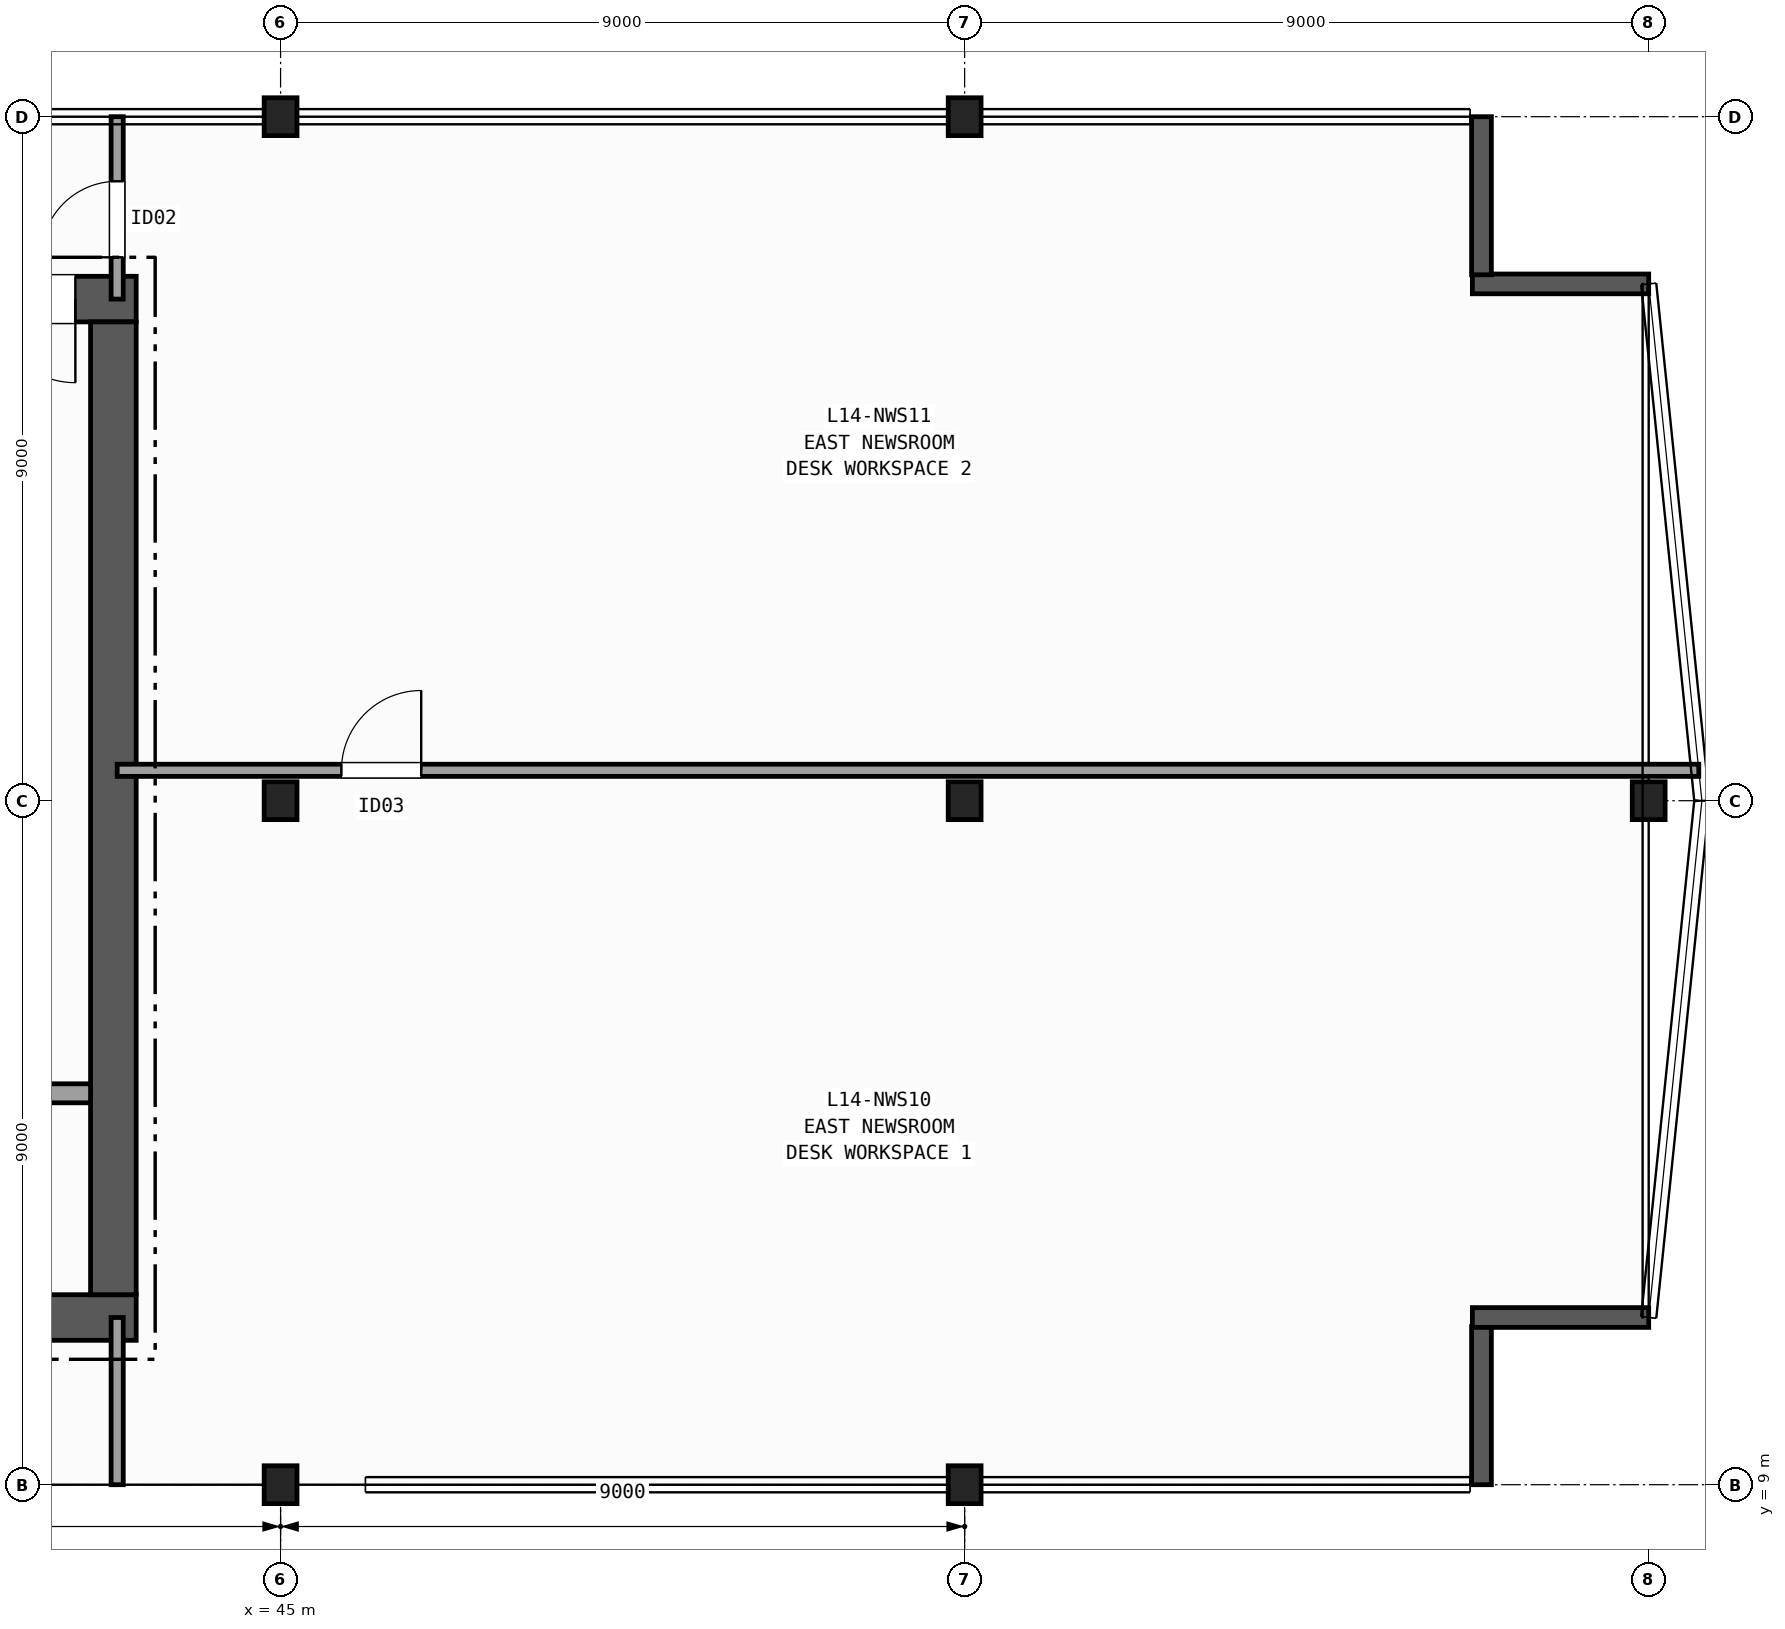
"""IFC4 building model, lengths in metres.
Left out: names, types, materials, properties, quantities, classifications, styles, units other than length and angle.
Written with IfcOpenShell. Run it as: python <this file> out.ifc"""

import sys

from ifc_helpers import new_model, si_unit, direction, frame, frame_2d, origin, origin_2d, place, context, subcontext, project, spatial, rectangle, i_section, extrude, element, fill, save


model = new_model("IFC4")
c1 = context("Model", 3, precision=1e-05, world=origin(), true_north=direction((0.0, 1.0)))
c2 = subcontext(c1, "Body", "Model", "MODEL_VIEW")
j1 = project(units=[si_unit("LENGTHUNIT", "METRE"), si_unit("PLANEANGLEUNIT", "RADIAN")], contexts=[c1])
p1 = place(None, origin())
s1 = spatial("IfcSite", under=j1, at=p1, CompositionType="ELEMENT")
p2 = place(p1, origin())
s2 = spatial("IfcBuilding", under=s1, at=p2, CompositionType="ELEMENT")
p3 = place(p2, frame((0.0, 0.0, 61.9)))
s3 = spatial("IfcBuildingStorey", under=s2, at=p3, CompositionType="ELEMENT", Elevation=61.9)
for number, where, z_axis, x_axis in (
    (1, (45.0, 9.0, 0.0), (0.0, 0.0, 1.0), (1.0, 0.0, 0.0)),
    (2, (45.0, 18.0, 0.0), (0.0, 0.0, 1.0), (1.0, 0.0, 0.0)),
    (3, (45.0, 27.0, 0.0), (0.0, 0.0, 1.0), (1.0, 0.0, 0.0)),
    (4, (54.0, 9.0, 0.0), (0.0, 0.0, 1.0), (1.0, 0.0, 0.0)),
    (5, (54.0, 18.0, 0.0), (0.0, 0.0, 1.0), (1.0, 0.0, 0.0)),
    (6, (54.0, 27.0, 0.0), (0.0, 0.0, 1.0), (1.0, 0.0, 0.0)),
    (7, (63.0, 18.0, 0.0), (0.0, 0.0, 1.0), (1.0, 0.0, 0.0)),
):
    element("IfcColumn", number, at=place(p3, frame(where, z_axis=z_axis, x_axis=x_axis)), inside=s3, PredefinedType="COLUMN", context=c2, shape_type="SweptSolid", body=[
        extrude(i_section(OverallWidth=0.432, OverallDepth=0.498, WebThickness=0.056, FlangeThickness=0.089, FilletRadius=0.015, at=origin_2d()), origin(), (0.0, 0.0, 1.0), 3.7),
    ])
p4 = place(p3, frame((60.8, 9.0, 0.0), z_axis=(0.0, 0.0, 1.0), x_axis=(0.0, 1.0, 0.0)))
e8 = element("IfcWall", 8, at=p4, inside=s3, PredefinedType="SOLIDWALL", context=c2, shape_type="SweptSolid", body=[
    extrude(rectangle(XDim=2.08, YDim=0.26, at=frame_2d((1.04, 0.0))), origin(), (0.0, 0.0, 1.0), 3.42),
])
for number, where, z_axis, x_axis in (
    (9, (60.68, 11.2, 0.0), (0.0, 0.0, 1.0), (1.0, 0.0, 0.0)),
    (10, (63.0, 24.8, 0.0), (0.0, 0.0, 1.0), (-1.0, 0.0, 0.0)),
):
    element("IfcWall", number, at=place(p3, frame(where, z_axis=z_axis, x_axis=x_axis)), inside=s3, PredefinedType="SOLIDWALL", context=c2, shape_type="SweptSolid", body=[
        extrude(rectangle(XDim=2.32, YDim=0.26, at=frame_2d((1.16, 0.0))), origin(), (0.0, 0.0, 1.0), 3.42),
    ])
p5 = place(p3, frame((60.8, 24.92, 0.0), z_axis=(0.0, 0.0, 1.0), x_axis=(0.0, 1.0, 0.0)))
e11 = element("IfcWall", 11, at=p5, inside=s3, PredefinedType="SOLIDWALL", context=c2, shape_type="SweptSolid", body=[
    extrude(rectangle(XDim=2.08, YDim=0.26, at=frame_2d((1.04, 0.0))), origin(), (0.0, 0.0, 1.0), 3.42),
])
p6 = place(p3, frame((29.1, 11.2, 0.0), z_axis=(0.0, 0.0, 1.0), x_axis=(1.0, 0.0, 0.0)))
e12 = element("IfcWall", 12, at=p6, inside=s3, PredefinedType="SHEAR", context=c2, shape_type="SweptSolid", body=[
    extrude(rectangle(XDim=14.0, YDim=0.6, at=frame_2d((7.0, 0.0))), origin(), (0.0, 0.0, 1.0), 3.42),
])
p7 = place(p3, frame((43.1, 24.6, 0.0), z_axis=(0.0, 0.0, 1.0), x_axis=(-1.0, 0.0, 0.0)))
e13 = element("IfcWall", 13, at=p7, inside=s3, PredefinedType="SHEAR", context=c2, shape_type="SweptSolid", body=[
    extrude(rectangle(XDim=14.0, YDim=0.6, at=frame_2d((7.0, 0.0))), origin(), (0.0, 0.0, 1.0), 3.42),
])
p8 = place(p7, frame((0.8, 0.0, 0.0)))
e14 = element("IfcOpeningElement", 14, at=p8, cuts=e13, PredefinedType="OPENING", context=c2, shape_type="SweptSolid", body=[
    extrude(rectangle(XDim=1.1, YDim=2.15, at=frame_2d((0.55, 1.075))), frame((0.0, 0.31, 0.0), z_axis=(0.0, -1.0, 0.0), x_axis=(1.0, 0.0, 0.0)), (0.0, 0.0, 1.0), 0.62),
])
p9 = place(p7, frame((2.75, 0.0, 0.0)))
e15 = element("IfcOpeningElement", 15, at=p9, cuts=e13, PredefinedType="OPENING", context=c2, shape_type="SweptSolid", body=[
    extrude(rectangle(XDim=0.9, YDim=2.1, at=frame_2d((0.45, 1.05))), frame((0.0, 0.31, 0.0), z_axis=(0.0, -1.0, 0.0), x_axis=(1.0, 0.0, 0.0)), (0.0, 0.0, 1.0), 0.62),
])
p10 = place(p7, frame((4.65, 0.0, 0.0)))
e16 = element("IfcOpeningElement", 16, at=p10, cuts=e13, PredefinedType="OPENING", context=c2, shape_type="SweptSolid", body=[
    extrude(rectangle(XDim=0.9, YDim=2.1, at=frame_2d((0.45, 1.05))), frame((0.0, 0.31, 0.0), z_axis=(0.0, -1.0, 0.0), x_axis=(1.0, 0.0, 0.0)), (0.0, 0.0, 1.0), 0.62),
])
p11 = place(p3, frame((42.8, 11.5, 0.0), z_axis=(0.0, 0.0, 1.0), x_axis=(0.0, 1.0, 0.0)))
e17 = element("IfcWall", 17, at=p11, inside=s3, PredefinedType="SHEAR", context=c2, shape_type="SweptSolid", body=[
    extrude(rectangle(XDim=12.8, YDim=0.6, at=frame_2d((6.4, 0.0))), origin(), (0.0, 0.0, 1.0), 3.42),
])
p12 = place(p3, frame((33.07, 14.15, 0.0), z_axis=(0.0, 0.0, 1.0), x_axis=(1.0, 0.0, 0.0)))
e18 = element("IfcWall", 18, at=p12, inside=s3, PredefinedType="PARTITIONING", context=c2, shape_type="SweptSolid", body=[
    extrude(rectangle(XDim=9.43, YDim=0.25, at=frame_2d((4.715, 0.0))), origin(), (0.0, 0.0, 1.0), 3.42),
])
p13 = place(p12, frame((0.755, 0.0, 0.0)))
e19 = element("IfcOpeningElement", 19, at=p13, cuts=e18, PredefinedType="OPENING", context=c2, shape_type="SweptSolid", body=[
    extrude(rectangle(XDim=1.15, YDim=2.15, at=frame_2d((0.575, 1.075))), frame((0.0, 0.135, 0.0), z_axis=(0.0, -1.0, 0.0), x_axis=(1.0, 0.0, 0.0)), (0.0, 0.0, 1.0), 0.27),
])
p14 = place(p12, frame((3.355, 0.0, 0.0)))
e20 = element("IfcOpeningElement", 20, at=p14, cuts=e18, PredefinedType="OPENING", context=c2, shape_type="SweptSolid", body=[
    extrude(rectangle(XDim=1.15, YDim=2.15, at=frame_2d((0.575, 1.075))), frame((0.0, 0.135, 0.0), z_axis=(0.0, -1.0, 0.0), x_axis=(1.0, 0.0, 0.0)), (0.0, 0.0, 1.0), 0.27),
])
p15 = place(p3, frame((42.85, 9.0, 0.0), z_axis=(0.0, 0.0, 1.0), x_axis=(0.0, 1.0, 0.0)))
e21 = element("IfcWall", 21, at=p15, inside=s3, PredefinedType="PARTITIONING", context=c2, shape_type="SweptSolid", body=[
    extrude(rectangle(XDim=2.2, YDim=0.16, at=frame_2d((1.1, 0.0))), origin(), (0.0, 0.0, 1.0), 2.627),
])
p16 = place(p3, frame((42.85, 24.6, 0.0), z_axis=(0.0, 0.0, 1.0), x_axis=(0.0, 1.0, 0.0)))
e22 = element("IfcWall", 22, at=p16, inside=s3, PredefinedType="PARTITIONING", context=c2, shape_type="SweptSolid", body=[
    extrude(rectangle(XDim=2.4, YDim=0.16, at=frame_2d((1.2, 0.0))), origin(), (0.0, 0.0, 1.0), 2.627),
])
p17 = place(p16, frame((0.55, 0.0, 0.0)))
e23 = element("IfcOpeningElement", 23, at=p17, cuts=e22, PredefinedType="OPENING", context=c2, shape_type="SweptSolid", body=[
    extrude(rectangle(XDim=1.0, YDim=2.1, at=frame_2d((0.5, 1.05))), frame((0.0, 0.09, 0.0), z_axis=(0.0, -1.0, 0.0), x_axis=(1.0, 0.0, 0.0)), (0.0, 0.0, 1.0), 0.18),
])
p18 = place(p3, frame((42.85, 18.4, 0.0), z_axis=(0.0, 0.0, 1.0), x_axis=(1.0, 0.0, 0.0)))
e24 = element("IfcWall", 24, at=p18, inside=s3, PredefinedType="PARTITIONING", context=c2, shape_type="SweptSolid", body=[
    extrude(rectangle(XDim=20.809, YDim=0.16, at=frame_2d((10.404, 0.0))), origin(), (0.0, 0.0, 1.0), 3.42),
])
p19 = place(p18, frame((2.95, 0.0, 0.0)))
e25 = element("IfcOpeningElement", 25, at=p19, cuts=e24, PredefinedType="OPENING", context=c2, shape_type="SweptSolid", body=[
    extrude(rectangle(XDim=1.05, YDim=2.15, at=frame_2d((0.525, 1.075))), frame((0.0, 0.09, 0.0), z_axis=(0.0, -1.0, 0.0), x_axis=(1.0, 0.0, 0.0)), (0.0, 0.0, 1.0), 0.18),
])
p20 = place(p8, origin())
e26 = element("IfcDoor", 26, at=p20, inside=s3, OperationType="SINGLE_SWING_LEFT", PredefinedType="DOOR", context=c2, shape_type="SweptSolid", body=[
    extrude(rectangle(XDim=1.1, YDim=2.15, at=frame_2d((0.55, 1.075))), frame((0.0, 0.025, 0.0), z_axis=(0.0, -1.0, 0.0), x_axis=(1.0, 0.0, 0.0)), (0.0, 0.0, 1.0), 0.05),
])
fill(e14, e26)
p21 = place(p17, origin())
e27 = element("IfcDoor", 27, at=p21, inside=s3, OperationType="SINGLE_SWING_LEFT", PredefinedType="DOOR", context=c2, shape_type="SweptSolid", body=[
    extrude(rectangle(XDim=1.0, YDim=2.1, at=frame_2d((0.5, 1.05))), frame((0.0, 0.025, 0.0), z_axis=(0.0, -1.0, 0.0), x_axis=(1.0, 0.0, 0.0)), (0.0, 0.0, 1.0), 0.05),
])
fill(e23, e27)
p22 = place(p19, origin())
e28 = element("IfcDoor", 28, at=p22, inside=s3, OperationType="SINGLE_SWING_RIGHT", PredefinedType="DOOR", context=c2, shape_type="SweptSolid", body=[
    extrude(rectangle(XDim=1.05, YDim=2.15, at=frame_2d((0.525, 1.075))), frame((0.0, 0.025, 0.0), z_axis=(0.0, -1.0, 0.0), x_axis=(1.0, 0.0, 0.0)), (0.0, 0.0, 1.0), 0.05),
])
fill(e25, e28)
save(model, sys.argv[1])
